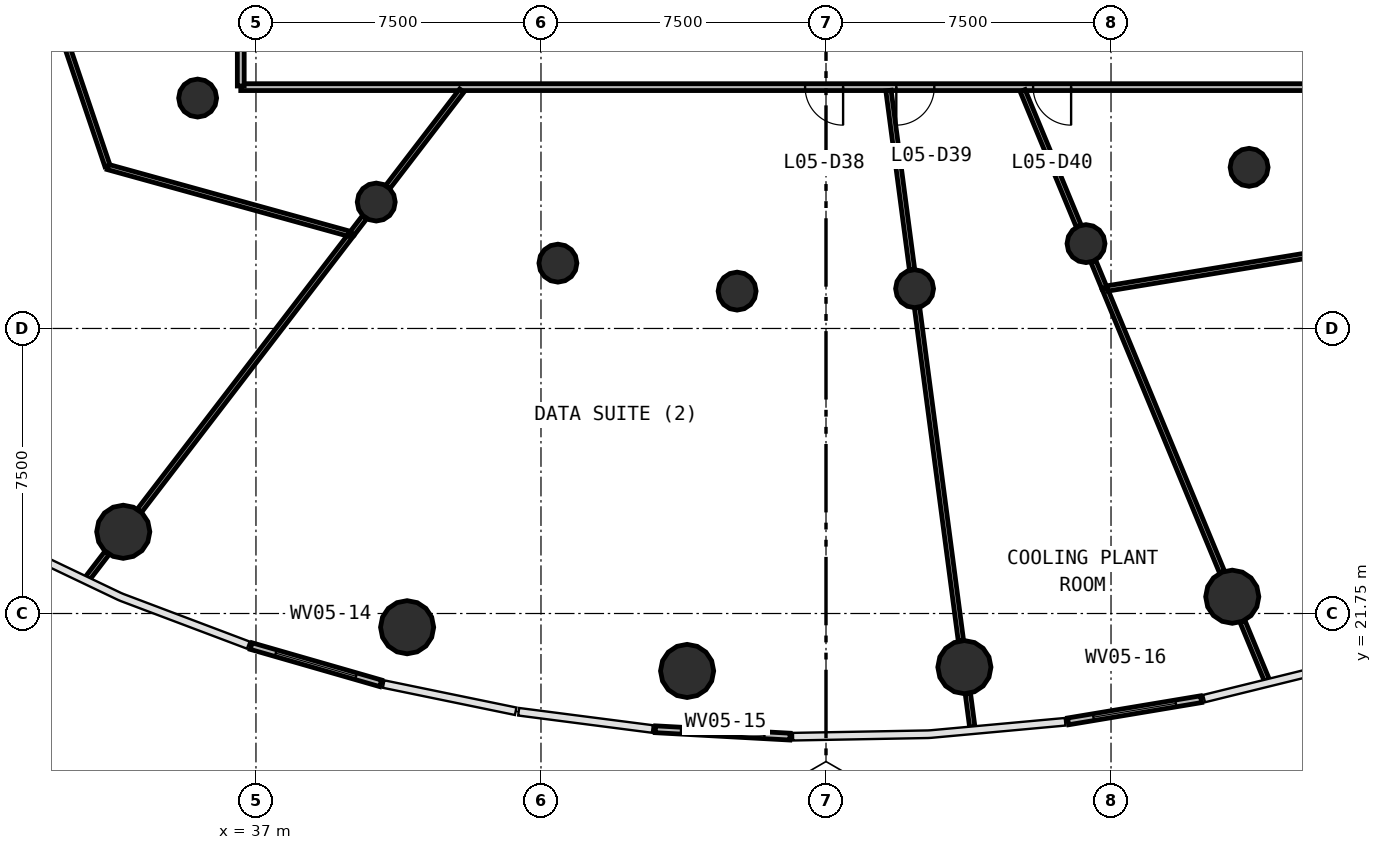
"""IFC4 building model, lengths in metres.
Left out: names, types, materials, properties, quantities, classifications, styles, units other than length and angle.
Written with IfcOpenShell. Run it as: python <this file> out.ifc"""

import sys

from ifc_helpers import new_model, si_unit, direction, frame, frame_2d, origin, origin_2d, place, context, subcontext, project, spatial, rectangle, circle, extrude, source, transform, mapped, element, fill, save


model = new_model("IFC4")
c1 = context("Model", 3, precision=1e-05, world=origin(), true_north=direction((0.0, 1.0)))
c2 = subcontext(c1, "Body", "Model", "MODEL_VIEW")
j1 = project(units=[si_unit("LENGTHUNIT", "METRE"), si_unit("PLANEANGLEUNIT", "RADIAN")], contexts=[c1])
p1 = place(None, origin())
s1 = spatial("IfcSite", under=j1, at=p1, CompositionType="ELEMENT")
p2 = place(p1, origin())
s2 = spatial("IfcBuilding", under=s1, at=p2, CompositionType="ELEMENT")
p3 = place(p2, frame((0.0, 0.0, 22.6)))
s3 = spatial("IfcBuildingStorey", under=s2, at=p3, CompositionType="ELEMENT", Elevation=22.6)
m1 = source(origin(), c2, "Body", "SweptSolid", [
    extrude(circle(Radius=0.7, at=origin_2d()), origin(), (0.0, 0.0, 1.0), 4.4),
])
for number, where, z_axis, x_axis in (
    (1, (33.508, 23.9, 0.0), (0.0, 0.0, 1.0), (1.0, 0.0, 0.0)),
    (2, (40.977, 21.389, 0.0), (0.0, 0.0, 1.0), (1.0, 0.0, 0.0)),
    (3, (48.345, 20.239, 0.0), (0.0, 0.0, 1.0), (1.0, 0.0, 0.0)),
    (4, (55.642, 20.339, 0.0), (0.0, 0.0, 1.0), (1.0, 0.0, 0.0)),
    (5, (62.69, 22.191, 0.0), (0.0, 0.0, 1.0), (1.0, 0.0, 0.0)),
):
    element("IfcColumn", number, at=place(p3, frame(where, z_axis=z_axis, x_axis=x_axis)), inside=s3, PredefinedType="COLUMN", context=c2, shape_type="MappedRepresentation", body=[
        mapped(m1, transform((0.0, 0.0, 0.0), scale=1.0)),
    ])
m2 = source(origin(), c2, "Body", "SweptSolid", [
    extrude(circle(Radius=0.5, at=origin_2d()), origin(), (0.0, 0.0, 1.0), 4.4),
])
for number, where, z_axis, x_axis in (
    (6, (35.465, 35.312, 0.0), (0.0, 0.0, 1.0), (1.0, 0.0, 0.0)),
    (7, (40.165, 32.576, 0.0), (0.0, 0.0, 1.0), (1.0, 0.0, 0.0)),
    (8, (44.945, 30.969, 0.0), (0.0, 0.0, 1.0), (1.0, 0.0, 0.0)),
    (9, (49.661, 30.233, 0.0), (0.0, 0.0, 1.0), (1.0, 0.0, 0.0)),
    (10, (54.331, 30.297, 0.0), (0.0, 0.0, 1.0), (1.0, 0.0, 0.0)),
    (11, (58.842, 31.482, 0.0), (0.0, 0.0, 1.0), (1.0, 0.0, 0.0)),
    (12, (63.134, 33.49, 0.0), (0.0, 0.0, 1.0), (1.0, 0.0, 0.0)),
):
    element("IfcColumn", number, at=place(p3, frame(where, z_axis=z_axis, x_axis=x_axis)), inside=s3, PredefinedType="COLUMN", context=c2, shape_type="MappedRepresentation", body=[
        mapped(m2, transform((0.0, 0.0, 0.0), scale=1.0)),
    ])
p4 = place(p3, frame((36.873, 20.893, 0.0), z_axis=(0.0, 0.0, 1.0), x_axis=(0.961021084102, -0.276475090943, 0.0)))
e13 = element("IfcWall", 13, at=p4, inside=s3, PredefinedType="STANDARD", context=c2, shape_type="SweptSolid", body=[
    extrude(rectangle(XDim=3.547, YDim=0.18, at=frame_2d((1.773, 0.0))), origin(), (0.0, 0.0, 1.0), 3.698),
])
p5 = place(p4, frame((0.674, 0.0, 0.9)))
e14 = element("IfcOpeningElement", 14, at=p5, cuts=e13, PredefinedType="OPENING", context=c2, shape_type="SweptSolid", body=[
    extrude(rectangle(XDim=2.2, YDim=2.2, at=frame_2d((1.1, 1.1))), frame((0.0, 0.1, 0.0), z_axis=(0.0, -1.0, 0.0), x_axis=(1.0, 0.0, 0.0)), (0.0, 0.0, 1.0), 0.2),
])
p6 = place(p3, frame((47.511, 18.704, 0.0), z_axis=(0.0, 0.0, 1.0), x_axis=(0.99850950861, -0.054578028696, 0.0)))
e15 = element("IfcWall", 15, at=p6, inside=s3, PredefinedType="STANDARD", context=c2, shape_type="SweptSolid", body=[
    extrude(rectangle(XDim=3.547, YDim=0.18, at=frame_2d((1.774, 0.0))), origin(), (0.0, 0.0, 1.0), 3.95),
])
p7 = place(p6, frame((0.674, 0.0, 0.9)))
e16 = element("IfcOpeningElement", 16, at=p7, cuts=e15, PredefinedType="OPENING", context=c2, shape_type="SweptSolid", body=[
    extrude(rectangle(XDim=2.2, YDim=2.2, at=frame_2d((1.1, 1.1))), frame((0.0, 0.1, 0.0), z_axis=(0.0, -1.0, 0.0), x_axis=(1.0, 0.0, 0.0)), (0.0, 0.0, 1.0), 0.2),
])
p8 = place(p3, frame((58.372, 18.912, 0.0), z_axis=(0.0, 0.0, 1.0), x_axis=(0.986367870411, 0.164555231521, 0.0)))
e17 = element("IfcWall", 17, at=p8, inside=s3, PredefinedType="STANDARD", context=c2, shape_type="SweptSolid", body=[
    extrude(rectangle(XDim=3.547, YDim=0.18, at=frame_2d((1.774, 0.0))), origin(), (0.0, 0.0, 1.0), 3.95),
])
p9 = place(p8, frame((0.674, 0.0, 0.9)))
e18 = element("IfcOpeningElement", 18, at=p9, cuts=e17, PredefinedType="OPENING", context=c2, shape_type="SweptSolid", body=[
    extrude(rectangle(XDim=2.2, YDim=2.2, at=frame_2d((1.1, 1.1))), frame((0.0, 0.1, 0.0), z_axis=(0.0, -1.0, 0.0), x_axis=(1.0, 0.0, 0.0)), (0.0, 0.0, 1.0), 0.2),
])
p10 = place(p3, frame((67.4, 35.6, 0.0), z_axis=(0.0, 0.0, 1.0), x_axis=(-1.0, 0.0, 0.0)))
e19 = element("IfcWall", 19, at=p10, inside=s3, PredefinedType="PARTITIONING", context=c2, shape_type="SweptSolid", body=[
    extrude(rectangle(XDim=30.8, YDim=0.18, at=frame_2d((15.4, 0.0))), origin(), (0.0, 0.0, 1.0), 3.05),
])
p11 = place(p10, frame((14.95, 0.0, 0.0)))
e20 = element("IfcOpeningElement", 20, at=p11, cuts=e19, PredefinedType="OPENING", context=c2, shape_type="SweptSolid", body=[
    extrude(rectangle(XDim=1.0, YDim=2.1, at=frame_2d((0.5, 1.05))), frame((0.0, 0.1, 0.0), z_axis=(0.0, -1.0, 0.0), x_axis=(1.0, 0.0, 0.0)), (0.0, 0.0, 1.0), 0.2),
])
p12 = place(p10, frame((12.55, 0.0, 0.0)))
e21 = element("IfcOpeningElement", 21, at=p12, cuts=e19, PredefinedType="OPENING", context=c2, shape_type="SweptSolid", body=[
    extrude(rectangle(XDim=1.0, YDim=2.1, at=frame_2d((0.5, 1.05))), frame((0.0, 0.1, 0.0), z_axis=(0.0, -1.0, 0.0), x_axis=(1.0, 0.0, 0.0)), (0.0, 0.0, 1.0), 0.2),
])
p13 = place(p10, frame((8.95, 0.0, 0.0)))
e22 = element("IfcOpeningElement", 22, at=p13, cuts=e19, PredefinedType="OPENING", context=c2, shape_type="SweptSolid", body=[
    extrude(rectangle(XDim=1.0, YDim=2.1, at=frame_2d((0.5, 1.05))), frame((0.0, 0.1, 0.0), z_axis=(0.0, -1.0, 0.0), x_axis=(1.0, 0.0, 0.0)), (0.0, 0.0, 1.0), 0.2),
])
p14 = place(p3, frame((36.6, 35.63, 0.0), z_axis=(0.0, 0.0, 1.0), x_axis=(0.0, 1.0, 0.0)))
e23 = element("IfcWall", 23, at=p14, inside=s3, PredefinedType="PARTITIONING", context=c2, shape_type="SweptSolid", body=[
    extrude(rectangle(XDim=23.583, YDim=0.18, at=frame_2d((11.791, 0.0))), origin(), (0.0, 0.0, 1.0), 3.05),
])
p15 = place(p14, frame((14.732, 0.0, 0.0)))
e24 = element("IfcOpeningElement", 24, at=p15, cuts=e23, PredefinedType="OPENING", context=c2, shape_type="SweptSolid", body=[
    extrude(rectangle(XDim=1.0, YDim=2.1, at=frame_2d((0.5, 1.05))), frame((0.0, 0.1, 0.0), z_axis=(0.0, -1.0, 0.0), x_axis=(1.0, 0.0, 0.0)), (0.0, 0.0, 1.0), 0.2),
])
p16 = place(p14, frame((11.333, 0.0, 0.0)))
e25 = element("IfcOpeningElement", 25, at=p16, cuts=e23, PredefinedType="OPENING", context=c2, shape_type="SweptSolid", body=[
    extrude(rectangle(XDim=1.0, YDim=2.1, at=frame_2d((0.5, 1.05))), frame((0.0, 0.1, 0.0), z_axis=(0.0, -1.0, 0.0), x_axis=(1.0, 0.0, 0.0)), (0.0, 0.0, 1.0), 0.2),
])
p17 = place(p3, frame((39.512, 31.726, 0.0), z_axis=(0.0, 0.0, 1.0), x_axis=(-0.608766118587, -0.793349741829, 0.0)))
e26 = element("IfcWall", 26, at=p17, inside=s3, PredefinedType="PARTITIONING", context=c2, shape_type="SweptSolid", body=[
    extrude(rectangle(XDim=9.159, YDim=0.14, at=frame_2d((4.58, 0.0))), origin(), (0.0, 0.0, 1.0), 3.05),
])
p18 = place(p3, frame((54.396, 29.797, 0.0), z_axis=(0.0, 0.0, 1.0), x_axis=(0.130534568438, -0.991443758588, 0.0)))
e27 = element("IfcWall", 27, at=p18, inside=s3, PredefinedType="PARTITIONING", context=c2, shape_type="SweptSolid", body=[
    extrude(rectangle(XDim=8.835, YDim=0.14, at=frame_2d((4.418, 0.0))), origin(), (0.0, 0.0, 1.0), 3.05),
])
p19 = place(p3, frame((59.335, 30.291, 0.0), z_axis=(0.0, 0.0, 1.0), x_axis=(0.38267718825, -0.923882118884, 0.0)))
e28 = element("IfcWall", 28, at=p19, inside=s3, PredefinedType="PARTITIONING", context=c2, shape_type="SweptSolid", body=[
    extrude(rectangle(XDim=8.062, YDim=0.14, at=frame_2d((4.031, 0.0))), origin(), (0.0, 0.0, 1.0), 3.05),
])
p20 = place(p3, frame((33.102, 33.499, 0.0), z_axis=(0.0, 0.0, 1.0), x_axis=(0.963800361675, -0.266624947885, 0.0)))
e29 = element("IfcWall", 29, at=p20, inside=s3, PredefinedType="PARTITIONING", context=c2, shape_type="SweptSolid", body=[
    extrude(rectangle(XDim=6.575, YDim=0.14, at=frame_2d((3.288, 0.0))), origin(), (0.0, 0.0, 1.0), 3.05),
])
p21 = place(p3, frame((31.255, 38.957, 0.0), z_axis=(0.0, 0.0, 1.0), x_axis=(0.320466828711, -0.947259738243, 0.0)))
e30 = element("IfcWall", 30, at=p21, inside=s3, PredefinedType="PARTITIONING", context=c2, shape_type="SweptSolid", body=[
    extrude(rectangle(XDim=5.732, YDim=0.14, at=frame_2d((2.866, 0.0))), origin(), (0.0, 0.0, 1.0), 3.05),
])
p22 = place(p3, frame((59.406, 30.303, 0.0), z_axis=(0.0, 0.0, 1.0), x_axis=(0.986685012905, 0.162642815117, 0.0)))
e31 = element("IfcWall", 31, at=p22, inside=s3, PredefinedType="PARTITIONING", context=c2, shape_type="SweptSolid", body=[
    extrude(rectangle(XDim=5.524, YDim=0.14, at=frame_2d((2.762, 0.0))), origin(), (0.0, 0.0, 1.0), 3.05),
])
p23 = place(p3, frame((53.644, 35.51, 0.0), z_axis=(0.0, 0.0, 1.0), x_axis=(0.130548834981, -0.991441880135, 0.0)))
e32 = element("IfcWall", 32, at=p23, inside=s3, PredefinedType="PARTITIONING", context=c2, shape_type="SweptSolid", body=[
    extrude(rectangle(XDim=4.754, YDim=0.14, at=frame_2d((2.377, 0.0))), origin(), (0.0, 0.0, 1.0), 3.05),
])
p24 = place(p3, frame((57.174, 35.51, 0.0), z_axis=(0.0, 0.0, 1.0), x_axis=(0.382644558062, -0.923895633817, 0.0)))
e33 = element("IfcWall", 33, at=p24, inside=s3, PredefinedType="PARTITIONING", context=c2, shape_type="SweptSolid", body=[
    extrude(rectangle(XDim=3.854, YDim=0.14, at=frame_2d((1.927, 0.0))), origin(), (0.0, 0.0, 1.0), 3.05),
])
p25 = place(p3, frame((42.416, 35.51, 0.0), z_axis=(0.0, 0.0, 1.0), x_axis=(-0.60874605662, -0.793365135703, 0.0)))
e34 = element("IfcWall", 34, at=p25, inside=s3, PredefinedType="PARTITIONING", context=c2, shape_type="SweptSolid", body=[
    extrude(rectangle(XDim=3.194, YDim=0.14, at=frame_2d((1.597, 0.0))), origin(), (0.0, 0.0, 1.0), 3.05),
])
p26 = place(p3, frame((62.96, 21.54, 0.0), z_axis=(0.0, 0.0, 1.0), x_axis=(0.382571117301, -0.923926046936, 0.0)))
e35 = element("IfcWall", 35, at=p26, inside=s3, PredefinedType="PARTITIONING", context=c2, shape_type="SweptSolid", body=[
    extrude(rectangle(XDim=1.671, YDim=0.14, at=frame_2d((0.836, 0.0))), origin(), (0.0, 0.0, 1.0), 3.05),
])
p27 = place(p3, frame((55.734, 19.64, 0.0), z_axis=(0.0, 0.0, 1.0), x_axis=(0.130632362566, -0.991430877999, 0.0)))
e36 = element("IfcWall", 36, at=p27, inside=s3, PredefinedType="PARTITIONING", context=c2, shape_type="SweptSolid", body=[
    extrude(rectangle(XDim=0.888, YDim=0.14, at=frame_2d((0.444, 0.0))), origin(), (0.0, 0.0, 1.0), 3.05),
])
p28 = place(p3, frame((33.079, 23.342, 0.0), z_axis=(0.0, 0.0, 1.0), x_axis=(-0.608939798959, -0.793216440351, 0.0)))
e37 = element("IfcWall", 37, at=p28, inside=s3, PredefinedType="PARTITIONING", context=c2, shape_type="SweptSolid", body=[
    extrude(rectangle(XDim=0.827, YDim=0.14, at=frame_2d((0.413, 0.0))), origin(), (0.0, 0.0, 1.0), 3.05),
])
p29 = place(p3, frame((59.035, 31.016, 0.0), z_axis=(0.0, 0.0, 1.0), x_axis=(0.382799508823, -0.923831443525, 0.0)))
e38 = element("IfcWall", 38, at=p29, inside=s3, PredefinedType="PARTITIONING", context=c2, shape_type="SweptSolid", body=[
    extrude(rectangle(XDim=0.754, YDim=0.14, at=frame_2d((0.377, 0.0))), origin(), (0.0, 0.0, 1.0), 3.05),
])
p30 = place(p3, frame((39.858, 32.176, 0.0), z_axis=(0.0, 0.0, 1.0), x_axis=(-0.608898529008, -0.793248120938, 0.0)))
e39 = element("IfcWall", 39, at=p30, inside=s3, PredefinedType="PARTITIONING", context=c2, shape_type="SweptSolid", body=[
    extrude(rectangle(XDim=0.538, YDim=0.14, at=frame_2d((0.269, 0.0))), origin(), (0.0, 0.0, 1.0), 3.05),
])
m3 = source(origin(), c2, "Body", "SweptSolid", [
    extrude(rectangle(XDim=2.2, YDim=2.2, at=frame_2d((1.1, 1.1))), frame((0.0, 0.03, 0.0), z_axis=(0.0, -1.0, 0.0), x_axis=(1.0, 0.0, 0.0)), (0.0, 0.0, 1.0), 0.06),
])
p31 = place(p5, origin())
e40 = element("IfcWindow", 40, at=p31, inside=s3, PartitioningType="SINGLE_PANEL", PredefinedType="WINDOW", context=c2, shape_type="MappedRepresentation", body=[
    mapped(m3, transform((0.0, 0.0, 0.0), scale=1.0)),
])
fill(e14, e40)
p32 = place(p7, origin())
e41 = element("IfcWindow", 41, at=p32, inside=s3, PartitioningType="SINGLE_PANEL", PredefinedType="WINDOW", context=c2, shape_type="MappedRepresentation", body=[
    mapped(m3, transform((0.0, 0.0, 0.0), scale=1.0)),
])
fill(e16, e41)
p33 = place(p9, origin())
e42 = element("IfcWindow", 42, at=p33, inside=s3, PartitioningType="SINGLE_PANEL", PredefinedType="WINDOW", context=c2, shape_type="MappedRepresentation", body=[
    mapped(m3, transform((0.0, 0.0, 0.0), scale=1.0)),
])
fill(e18, e42)
m4 = source(origin(), c2, "Body", "SweptSolid", [
    extrude(rectangle(XDim=1.0, YDim=2.1, at=frame_2d((0.5, 1.05))), frame((0.0, 0.025, 0.0), z_axis=(0.0, -1.0, 0.0), x_axis=(1.0, 0.0, 0.0)), (0.0, 0.0, 1.0), 0.05),
])
p34 = place(p11, origin())
e43 = element("IfcDoor", 43, at=p34, inside=s3, OperationType="SINGLE_SWING_LEFT", PredefinedType="DOOR", context=c2, shape_type="MappedRepresentation", body=[
    mapped(m4, transform((0.0, 0.0, 0.0), scale=1.0)),
])
fill(e20, e43)
p35 = place(p12, origin())
e44 = element("IfcDoor", 44, at=p35, inside=s3, OperationType="SINGLE_SWING_RIGHT", PredefinedType="DOOR", context=c2, shape_type="MappedRepresentation", body=[
    mapped(m4, transform((0.0, 0.0, 0.0), scale=1.0)),
])
fill(e21, e44)
p36 = place(p13, origin())
e45 = element("IfcDoor", 45, at=p36, inside=s3, OperationType="SINGLE_SWING_LEFT", PredefinedType="DOOR", context=c2, shape_type="MappedRepresentation", body=[
    mapped(m4, transform((0.0, 0.0, 0.0), scale=1.0)),
])
fill(e22, e45)
save(model, sys.argv[1])
